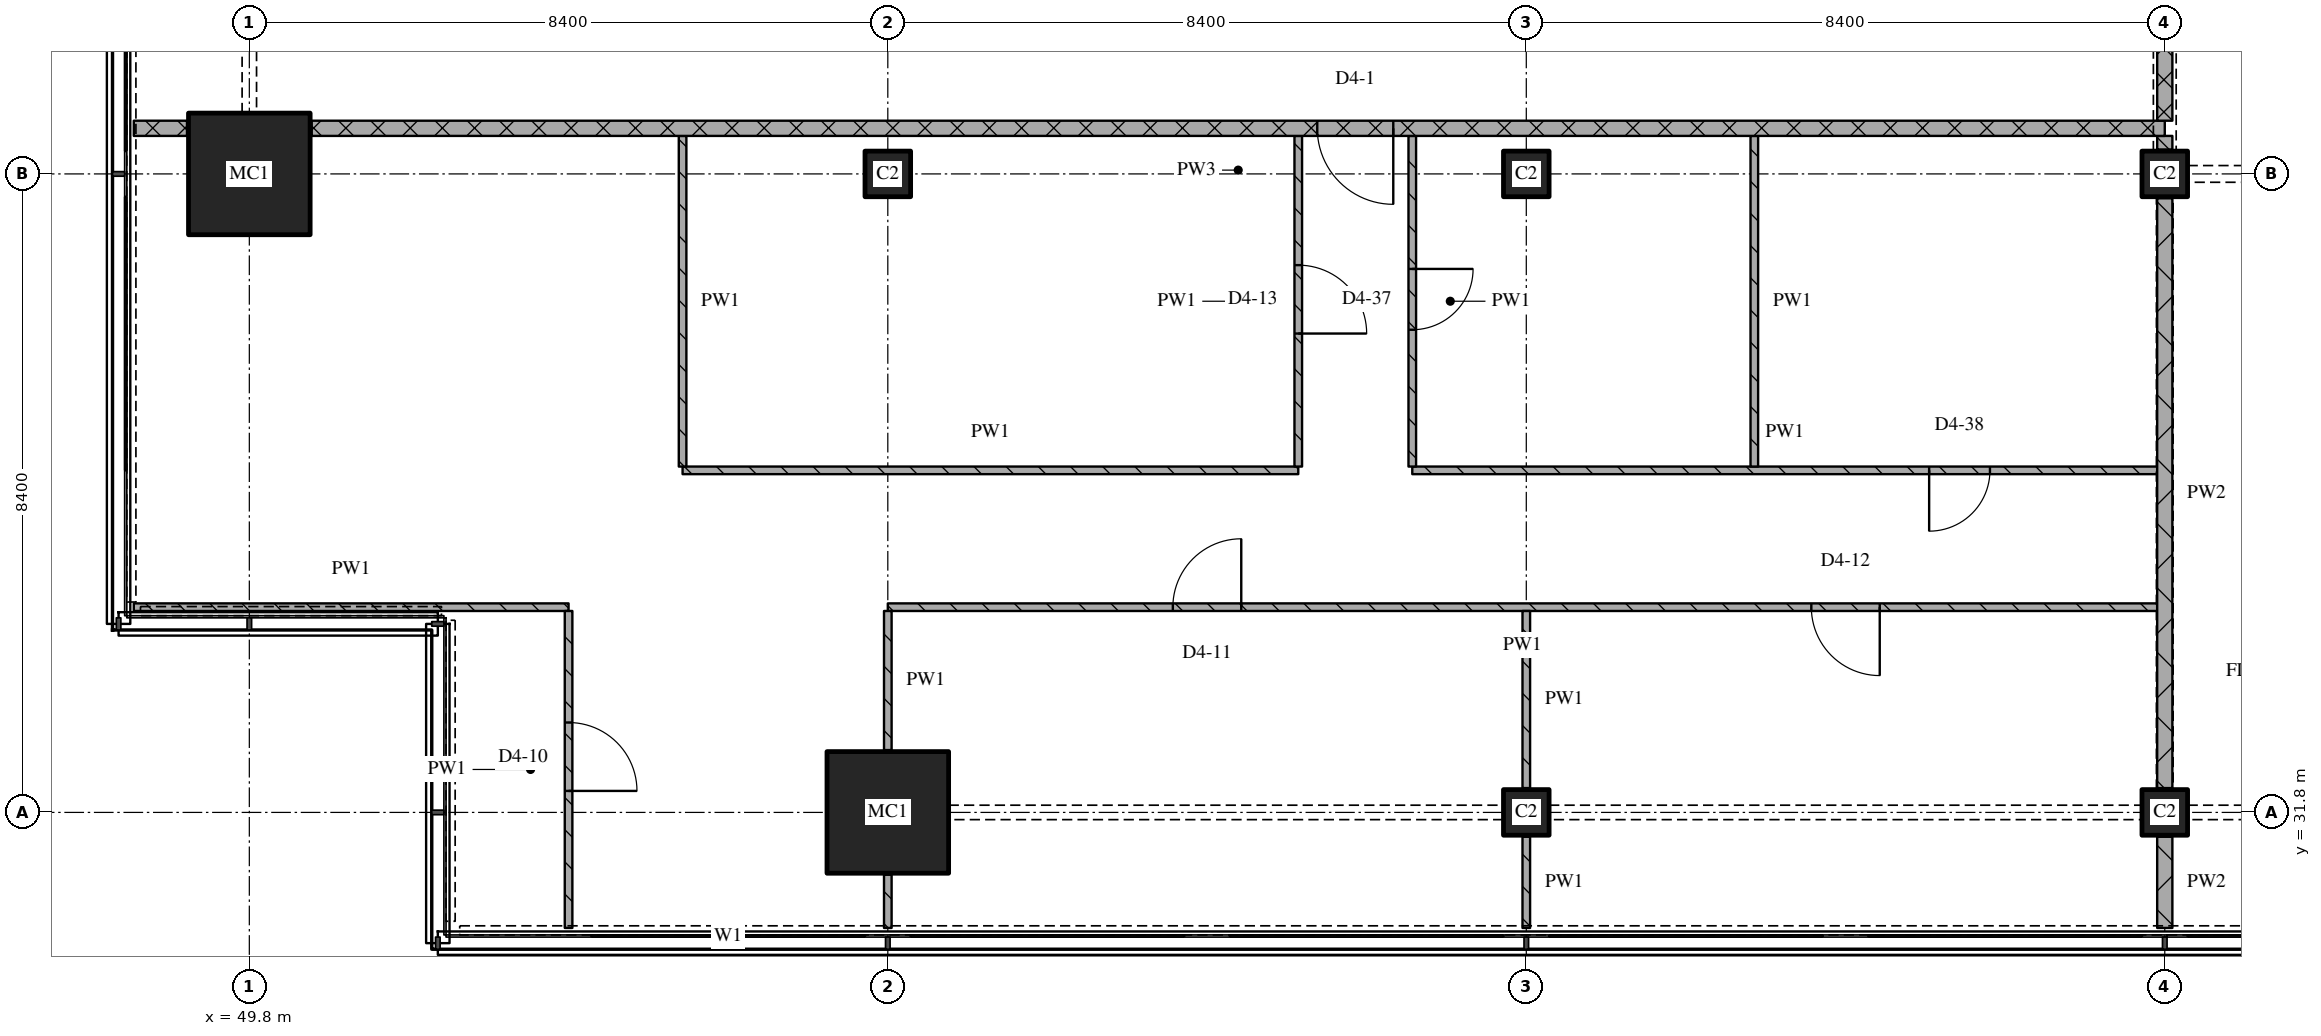
"""IFC4 building model, lengths in metres.
Left out: names, types, materials, properties, quantities, classifications, styles, units other than length and angle.
Written with IfcOpenShell. Run it as: python <this file> out.ifc"""

import sys

from ifc_helpers import new_model, si_unit, direction, frame, frame_2d, origin, origin_2d, place, context, subcontext, project, spatial, rectangle, extrude, element, fill, save


model = new_model("IFC4")
c1 = context("Model", 3, precision=1e-05, world=origin(), true_north=direction((0.0, 1.0)))
c2 = subcontext(c1, "Body", "Model", "MODEL_VIEW")
j1 = project(units=[si_unit("LENGTHUNIT", "METRE"), si_unit("PLANEANGLEUNIT", "RADIAN")], contexts=[c1])
p1 = place(None, origin())
s1 = spatial("IfcSite", under=j1, at=p1, CompositionType="ELEMENT")
p2 = place(p1, origin())
s2 = spatial("IfcBuilding", under=s1, at=p2, CompositionType="ELEMENT")
p3 = place(p2, frame((0.0, 0.0, 241.5)))
s3 = spatial("IfcBuildingStorey", under=s2, at=p3, CompositionType="ELEMENT", Elevation=241.5)
for number, where, z_axis, x_axis in (
    (1, (49.8, 40.2, 0.0), (0.0, 0.0, 1.0), (1.0, 0.0, 0.0)),
    (2, (58.2, 31.8, 0.0), (0.0, 0.0, 1.0), (1.0, 0.0, 0.0)),
):
    element("IfcColumn", number, at=place(p3, frame(where, z_axis=z_axis, x_axis=x_axis)), inside=s3, PredefinedType="COLUMN", context=c2, shape_type="SweptSolid", body=[
        extrude(rectangle(XDim=1.6, YDim=1.6, at=origin_2d()), origin(), (0.0, 0.0, 1.0), 3.6),
    ])
for number, where, z_axis, x_axis in (
    (3, (58.2, 40.2, 0.0), (0.0, 0.0, 1.0), (1.0, 0.0, 0.0)),
    (4, (66.6, 31.8, 0.0), (0.0, 0.0, 1.0), (1.0, 0.0, 0.0)),
    (5, (66.6, 40.2, 0.0), (0.0, 0.0, 1.0), (1.0, 0.0, 0.0)),
    (6, (75.0, 31.8, 0.0), (0.0, 0.0, 1.0), (1.0, 0.0, 0.0)),
    (7, (75.0, 40.2, 0.0), (0.0, 0.0, 1.0), (1.0, 0.0, 0.0)),
):
    element("IfcColumn", number, at=place(p3, frame(where, z_axis=z_axis, x_axis=x_axis)), inside=s3, PredefinedType="COLUMN", context=c2, shape_type="SweptSolid", body=[
        extrude(rectangle(XDim=0.6, YDim=0.6, at=origin_2d()), origin(), (0.0, 0.0, 1.0), 3.6),
    ])
p4 = place(p3, frame((48.28, 34.5, 0.0), z_axis=(0.0, 0.0, 1.0), x_axis=(1.0, 0.0, 0.0)))
e8 = element("IfcWall", 8, at=p4, inside=s3, PredefinedType="PARTITIONING", context=c2, shape_type="SweptSolid", body=[
    extrude(rectangle(XDim=5.72, YDim=0.1, at=frame_2d((2.86, 0.0))), origin(), (0.0, 0.0, 1.0), 3.32),
])
p5 = place(p3, frame((74.9, 34.5, 0.0), z_axis=(0.0, 0.0, 1.0), x_axis=(-1.0, 0.0, 0.0)))
e9 = element("IfcWall", 9, at=p5, inside=s3, PredefinedType="PARTITIONING", context=c2, shape_type="SweptSolid", body=[
    extrude(rectangle(XDim=16.7, YDim=0.1, at=frame_2d((8.35, 0.0))), origin(), (0.0, 0.0, 1.0), 3.32),
])
p6 = place(p5, frame((3.65, 0.0, 0.0)))
e10 = element("IfcOpeningElement", 10, at=p6, cuts=e9, PredefinedType="OPENING", context=c2, shape_type="SweptSolid", body=[
    extrude(rectangle(XDim=0.9, YDim=2.1, at=frame_2d((0.45, 1.05))), frame((0.0, 0.06, 0.0), z_axis=(0.0, -1.0, 0.0), x_axis=(1.0, 0.0, 0.0)), (0.0, 0.0, 1.0), 0.12),
])
p7 = place(p5, frame((12.05, 0.0, 0.0)))
e11 = element("IfcOpeningElement", 11, at=p7, cuts=e9, PredefinedType="OPENING", context=c2, shape_type="SweptSolid", body=[
    extrude(rectangle(XDim=0.9, YDim=2.1, at=frame_2d((0.45, 1.05))), frame((0.0, 0.06, 0.0), z_axis=(0.0, -1.0, 0.0), x_axis=(1.0, 0.0, 0.0)), (0.0, 0.0, 1.0), 0.12),
])
p8 = place(p3, frame((55.5, 36.3, 0.0), z_axis=(0.0, 0.0, 1.0), x_axis=(1.0, 0.0, 0.0)))
e12 = element("IfcWall", 12, at=p8, inside=s3, PredefinedType="PARTITIONING", context=c2, shape_type="SweptSolid", body=[
    extrude(rectangle(XDim=8.1, YDim=0.1, at=frame_2d((4.05, 0.0))), origin(), (0.0, 0.0, 1.0), 3.32),
])
p9 = place(p3, frame((65.1, 36.3, 0.0), z_axis=(0.0, 0.0, 1.0), x_axis=(1.0, 0.0, 0.0)))
e13 = element("IfcWall", 13, at=p9, inside=s3, PredefinedType="PARTITIONING", context=c2, shape_type="SweptSolid", body=[
    extrude(rectangle(XDim=9.8, YDim=0.1, at=frame_2d((4.9, 0.0))), origin(), (0.0, 0.0, 1.0), 3.32),
])
p10 = place(p9, frame((6.8, 0.0, 0.0)))
e14 = element("IfcOpeningElement", 14, at=p10, cuts=e13, PredefinedType="OPENING", context=c2, shape_type="SweptSolid", body=[
    extrude(rectangle(XDim=0.8, YDim=2.1, at=frame_2d((0.4, 1.05))), frame((0.0, 0.06, 0.0), z_axis=(0.0, -1.0, 0.0), x_axis=(1.0, 0.0, 0.0)), (0.0, 0.0, 1.0), 0.12),
])
p11 = place(p3, frame((48.28, 40.8, 0.0), z_axis=(0.0, 0.0, 1.0), x_axis=(1.0, 0.0, 0.0)))
e15 = element("IfcWall", 15, at=p11, inside=s3, PredefinedType="PARTITIONING", context=c2, shape_type="SweptSolid", body=[
    extrude(rectangle(XDim=0.7, YDim=0.2, at=frame_2d((0.35, 0.0))), origin(), (0.0, 0.0, 1.0), 3.32),
])
p12 = place(p3, frame((75.0, 40.8, 0.0), z_axis=(0.0, 0.0, 1.0), x_axis=(-1.0, 0.0, 0.0)))
e16 = element("IfcWall", 16, at=p12, inside=s3, PredefinedType="PARTITIONING", context=c2, shape_type="SweptSolid", body=[
    extrude(rectangle(XDim=24.38, YDim=0.2, at=frame_2d((12.19, 0.0))), origin(), (0.0, 0.0, 1.0), 3.32),
])
p13 = place(p12, frame((10.15, 0.0, 0.0)))
e17 = element("IfcOpeningElement", 17, at=p13, cuts=e16, PredefinedType="OPENING", context=c2, shape_type="SweptSolid", body=[
    extrude(rectangle(XDim=1.0, YDim=2.1, at=frame_2d((0.5, 1.05))), frame((0.0, 0.11, 0.0), z_axis=(0.0, -1.0, 0.0), x_axis=(1.0, 0.0, 0.0)), (0.0, 0.0, 1.0), 0.22),
])
p14 = place(p3, frame((54.0, 30.28, 0.0), z_axis=(0.0, 0.0, 1.0), x_axis=(0.0, 1.0, 0.0)))
e18 = element("IfcWall", 18, at=p14, inside=s3, PredefinedType="PARTITIONING", context=c2, shape_type="SweptSolid", body=[
    extrude(rectangle(XDim=4.17, YDim=0.1, at=frame_2d((2.085, 0.0))), origin(), (0.0, 0.0, 1.0), 3.32),
])
p15 = place(p14, frame((1.803, 0.0, 0.0)))
e19 = element("IfcOpeningElement", 19, at=p15, cuts=e18, PredefinedType="OPENING", context=c2, shape_type="SweptSolid", body=[
    extrude(rectangle(XDim=0.9, YDim=2.1, at=frame_2d((0.45, 1.05))), frame((0.0, 0.06, 0.0), z_axis=(0.0, -1.0, 0.0), x_axis=(1.0, 0.0, 0.0)), (0.0, 0.0, 1.0), 0.12),
])
p16 = place(p3, frame((55.5, 40.7, 0.0), z_axis=(0.0, 0.0, 1.0), x_axis=(0.0, -1.0, 0.0)))
e20 = element("IfcWall", 20, at=p16, inside=s3, PredefinedType="PARTITIONING", context=c2, shape_type="SweptSolid", body=[
    extrude(rectangle(XDim=4.35, YDim=0.1, at=frame_2d((2.175, 0.0))), origin(), (0.0, 0.0, 1.0), 3.32),
])
p17 = place(p3, frame((58.2, 30.98, 0.0), z_axis=(0.0, 0.0, 1.0), x_axis=(0.0, -1.0, 0.0)))
e21 = element("IfcWall", 21, at=p17, inside=s3, PredefinedType="PARTITIONING", context=c2, shape_type="SweptSolid", body=[
    extrude(rectangle(XDim=0.7, YDim=0.1, at=frame_2d((0.35, 0.0))), origin(), (0.0, 0.0, 1.0), 3.32),
])
p18 = place(p3, frame((58.2, 34.45, 0.0), z_axis=(0.0, 0.0, 1.0), x_axis=(0.0, -1.0, 0.0)))
e22 = element("IfcWall", 22, at=p18, inside=s3, PredefinedType="PARTITIONING", context=c2, shape_type="SweptSolid", body=[
    extrude(rectangle(XDim=1.83, YDim=0.1, at=frame_2d((0.915, 0.0))), origin(), (0.0, 0.0, 1.0), 3.32),
])
p19 = place(p3, frame((63.6, 36.35, 0.0), z_axis=(0.0, 0.0, 1.0), x_axis=(0.0, 1.0, 0.0)))
e23 = element("IfcWall", 23, at=p19, inside=s3, PredefinedType="PARTITIONING", context=c2, shape_type="SweptSolid", body=[
    extrude(rectangle(XDim=4.35, YDim=0.1, at=frame_2d((2.175, 0.0))), origin(), (0.0, 0.0, 1.0), 3.32),
])
p20 = place(p19, frame((1.75, 0.0, 0.0)))
e24 = element("IfcOpeningElement", 24, at=p20, cuts=e23, PredefinedType="OPENING", context=c2, shape_type="SweptSolid", body=[
    extrude(rectangle(XDim=0.9, YDim=2.1, at=frame_2d((0.45, 1.05))), frame((0.0, 0.06, 0.0), z_axis=(0.0, -1.0, 0.0), x_axis=(1.0, 0.0, 0.0)), (0.0, 0.0, 1.0), 0.12),
])
p21 = place(p3, frame((65.1, 40.7, 0.0), z_axis=(0.0, 0.0, 1.0), x_axis=(0.0, -1.0, 0.0)))
e25 = element("IfcWall", 25, at=p21, inside=s3, PredefinedType="PARTITIONING", context=c2, shape_type="SweptSolid", body=[
    extrude(rectangle(XDim=4.35, YDim=0.1, at=frame_2d((2.175, 0.0))), origin(), (0.0, 0.0, 1.0), 3.32),
])
p22 = place(p21, frame((1.75, 0.0, 0.0)))
e26 = element("IfcOpeningElement", 26, at=p22, cuts=e25, PredefinedType="OPENING", context=c2, shape_type="SweptSolid", body=[
    extrude(rectangle(XDim=0.8, YDim=2.1, at=frame_2d((0.4, 1.05))), frame((0.0, 0.06, 0.0), z_axis=(0.0, -1.0, 0.0), x_axis=(1.0, 0.0, 0.0)), (0.0, 0.0, 1.0), 0.12),
])
p23 = place(p3, frame((66.6, 31.48, 0.0), z_axis=(0.0, 0.0, 1.0), x_axis=(0.0, -1.0, 0.0)))
e27 = element("IfcWall", 27, at=p23, inside=s3, PredefinedType="PARTITIONING", context=c2, shape_type="SweptSolid", body=[
    extrude(rectangle(XDim=1.2, YDim=0.1, at=frame_2d((0.6, 0.0))), origin(), (0.0, 0.0, 1.0), 3.32),
])
p24 = place(p3, frame((66.6, 34.45, 0.0), z_axis=(0.0, 0.0, 1.0), x_axis=(0.0, -1.0, 0.0)))
e28 = element("IfcWall", 28, at=p24, inside=s3, PredefinedType="PARTITIONING", context=c2, shape_type="SweptSolid", body=[
    extrude(rectangle(XDim=2.33, YDim=0.1, at=frame_2d((1.165, 0.0))), origin(), (0.0, 0.0, 1.0), 3.32),
])
p25 = place(p3, frame((69.6, 40.7, 0.0), z_axis=(0.0, 0.0, 1.0), x_axis=(0.0, -1.0, 0.0)))
e29 = element("IfcWall", 29, at=p25, inside=s3, PredefinedType="PARTITIONING", context=c2, shape_type="SweptSolid", body=[
    extrude(rectangle(XDim=4.35, YDim=0.1, at=frame_2d((2.175, 0.0))), origin(), (0.0, 0.0, 1.0), 3.32),
])
p26 = place(p3, frame((75.0, 43.1, 0.0), z_axis=(0.0, 0.0, 1.0), x_axis=(0.0, -1.0, 0.0)))
e30 = element("IfcWall", 30, at=p26, inside=s3, PredefinedType="PARTITIONING", context=c2, shape_type="SweptSolid", body=[
    extrude(rectangle(XDim=2.2, YDim=0.2, at=frame_2d((1.1, 0.0))), origin(), (0.0, 0.0, 1.0), 2.53),
])
p27 = place(p3, frame((75.0, 31.48, 0.0), z_axis=(0.0, 0.0, 1.0), x_axis=(0.0, -1.0, 0.0)))
e31 = element("IfcWall", 31, at=p27, inside=s3, PredefinedType="PARTITIONING", context=c2, shape_type="SweptSolid", body=[
    extrude(rectangle(XDim=1.2, YDim=0.2, at=frame_2d((0.6, 0.0))), origin(), (0.0, 0.0, 1.0), 3.32),
])
p28 = place(p3, frame((75.0, 39.88, 0.0), z_axis=(0.0, 0.0, 1.0), x_axis=(0.0, -1.0, 0.0)))
e32 = element("IfcWall", 32, at=p28, inside=s3, PredefinedType="PARTITIONING", context=c2, shape_type="SweptSolid", body=[
    extrude(rectangle(XDim=7.76, YDim=0.2, at=frame_2d((3.88, 0.0))), origin(), (0.0, 0.0, 1.0), 2.72),
])
p29 = place(p3, frame((75.0, 40.7, 0.0), z_axis=(0.0, 0.0, 1.0), x_axis=(0.0, -1.0, 0.0)))
e33 = element("IfcWall", 33, at=p29, inside=s3, PredefinedType="PARTITIONING", context=c2, shape_type="SweptSolid", body=[
    extrude(rectangle(XDim=0.18, YDim=0.2, at=frame_2d((0.09, 0.0))), origin(), (0.0, 0.0, 1.0), 3.32),
])
p30 = place(p6, origin())
e34 = element("IfcDoor", 34, at=p30, inside=s3, OperationType="SINGLE_SWING_LEFT", PredefinedType="DOOR", context=c2, shape_type="SweptSolid", body=[
    extrude(rectangle(XDim=0.9, YDim=2.1, at=frame_2d((0.45, 1.05))), frame((0.0, 0.025, 0.0), z_axis=(0.0, -1.0, 0.0), x_axis=(1.0, 0.0, 0.0)), (0.0, 0.0, 1.0), 0.05),
])
fill(e10, e34)
p31 = place(p7, origin())
e35 = element("IfcDoor", 35, at=p31, inside=s3, OperationType="SINGLE_SWING_RIGHT", PredefinedType="DOOR", context=c2, shape_type="SweptSolid", body=[
    extrude(rectangle(XDim=0.9, YDim=2.1, at=frame_2d((0.45, 1.05))), frame((0.0, 0.025, 0.0), z_axis=(0.0, -1.0, 0.0), x_axis=(1.0, 0.0, 0.0)), (0.0, 0.0, 1.0), 0.05),
])
fill(e11, e35)
p32 = place(p10, origin())
e36 = element("IfcDoor", 36, at=p32, inside=s3, OperationType="SINGLE_SWING_RIGHT", PredefinedType="DOOR", context=c2, shape_type="SweptSolid", body=[
    extrude(rectangle(XDim=0.8, YDim=2.1, at=frame_2d((0.4, 1.05))), frame((0.0, 0.025, 0.0), z_axis=(0.0, -1.0, 0.0), x_axis=(1.0, 0.0, 0.0)), (0.0, 0.0, 1.0), 0.05),
])
fill(e14, e36)
p33 = place(p13, origin())
e37 = element("IfcDoor", 37, at=p33, inside=s3, OperationType="SINGLE_SWING_LEFT", PredefinedType="DOOR", context=c2, shape_type="SweptSolid", body=[
    extrude(rectangle(XDim=1.0, YDim=2.1, at=frame_2d((0.5, 1.05))), frame((0.0, 0.025, 0.0), z_axis=(0.0, -1.0, 0.0), x_axis=(1.0, 0.0, 0.0)), (0.0, 0.0, 1.0), 0.05),
])
fill(e17, e37)
p34 = place(p15, origin())
e38 = element("IfcDoor", 38, at=p34, inside=s3, OperationType="SINGLE_SWING_RIGHT", PredefinedType="DOOR", context=c2, shape_type="SweptSolid", body=[
    extrude(rectangle(XDim=0.9, YDim=2.1, at=frame_2d((0.45, 1.05))), frame((0.0, 0.025, 0.0), z_axis=(0.0, -1.0, 0.0), x_axis=(1.0, 0.0, 0.0)), (0.0, 0.0, 1.0), 0.05),
])
fill(e19, e38)
p35 = place(p20, origin())
e39 = element("IfcDoor", 39, at=p35, inside=s3, OperationType="SINGLE_SWING_RIGHT", PredefinedType="DOOR", context=c2, shape_type="SweptSolid", body=[
    extrude(rectangle(XDim=0.9, YDim=2.1, at=frame_2d((0.45, 1.05))), frame((0.0, 0.025, 0.0), z_axis=(0.0, -1.0, 0.0), x_axis=(1.0, 0.0, 0.0)), (0.0, 0.0, 1.0), 0.05),
])
fill(e24, e39)
p36 = place(p22, origin())
e40 = element("IfcDoor", 40, at=p36, inside=s3, OperationType="SINGLE_SWING_LEFT", PredefinedType="DOOR", context=c2, shape_type="SweptSolid", body=[
    extrude(rectangle(XDim=0.8, YDim=2.1, at=frame_2d((0.4, 1.05))), frame((0.0, 0.025, 0.0), z_axis=(0.0, -1.0, 0.0), x_axis=(1.0, 0.0, 0.0)), (0.0, 0.0, 1.0), 0.05),
])
fill(e26, e40)
save(model, sys.argv[1])
